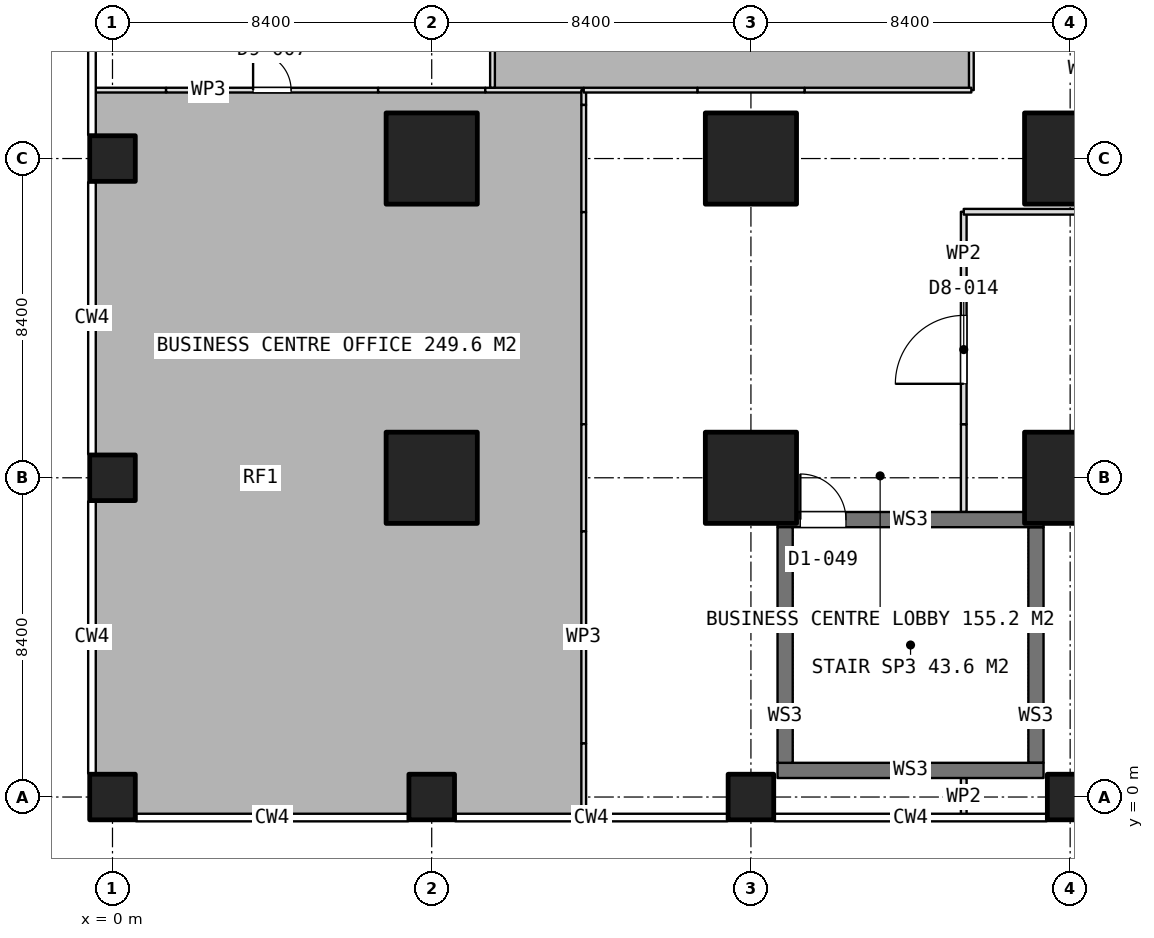
"""IFC4 building model, lengths in metres.
Left out: names, types, materials, properties, quantities, classifications, styles, units other than length and angle.
Written with IfcOpenShell. Run it as: python <this file> out.ifc"""

import sys

from ifc_helpers import new_model, si_unit, direction, frame, frame_2d, origin, origin_2d, place, context, subcontext, project, spatial, rectangle, extrude, element, fill, save


model = new_model("IFC4")
c1 = context("Model", 3, precision=1e-05, world=origin(), true_north=direction((0.0, 1.0)))
c2 = subcontext(c1, "Body", "Model", "MODEL_VIEW")
j1 = project(units=[si_unit("LENGTHUNIT", "METRE"), si_unit("PLANEANGLEUNIT", "RADIAN")], contexts=[c1])
p1 = place(None, origin())
s1 = spatial("IfcSite", under=j1, at=p1, CompositionType="ELEMENT")
p2 = place(p1, origin())
s2 = spatial("IfcBuilding", under=s1, at=p2, CompositionType="ELEMENT")
p3 = place(p2, frame((0.0, 0.0, 20.4)))
s3 = spatial("IfcBuildingStorey", under=s2, at=p3, CompositionType="ELEMENT", Elevation=20.4)
for number, where, z_axis, x_axis in (
    (1, (0.0, 0.0, 0.0), (0.0, 0.0, 1.0), (1.0, 0.0, 0.0)),
    (2, (0.0, 8.4, 0.0), (0.0, 0.0, 1.0), (1.0, 0.0, 0.0)),
    (3, (0.0, 16.8, 0.0), (0.0, 0.0, 1.0), (1.0, 0.0, 0.0)),
    (4, (8.4, 0.0, 0.0), (0.0, 0.0, 1.0), (1.0, 0.0, 0.0)),
):
    element("IfcColumn", number, at=place(p3, frame(where, z_axis=z_axis, x_axis=x_axis)), inside=s3, PredefinedType="COLUMN", context=c2, shape_type="SweptSolid", body=[
        extrude(rectangle(XDim=1.2, YDim=1.2, at=origin_2d()), origin(), (0.0, 0.0, 1.0), 5.0),
    ])
for number, where, z_axis, x_axis in (
    (5, (8.4, 8.4, 0.0), (0.0, 0.0, 1.0), (1.0, 0.0, 0.0)),
    (6, (8.4, 16.8, 0.0), (0.0, 0.0, 1.0), (1.0, 0.0, 0.0)),
):
    element("IfcColumn", number, at=place(p3, frame(where, z_axis=z_axis, x_axis=x_axis)), inside=s3, PredefinedType="COLUMN", context=c2, shape_type="SweptSolid", body=[
        extrude(rectangle(XDim=2.4, YDim=2.4, at=origin_2d()), origin(), (0.0, 0.0, 1.0), 5.0),
    ])
p4 = place(p3, frame((16.8, 0.0, 0.0), z_axis=(0.0, 0.0, 1.0), x_axis=(1.0, 0.0, 0.0)))
e7 = element("IfcColumn", 7, at=p4, inside=s3, PredefinedType="COLUMN", context=c2, shape_type="SweptSolid", body=[
    extrude(rectangle(XDim=1.2, YDim=1.2, at=origin_2d()), origin(), (0.0, 0.0, 1.0), 5.0),
])
for number, where, z_axis, x_axis in (
    (8, (16.8, 8.4, 0.0), (0.0, 0.0, 1.0), (1.0, 0.0, 0.0)),
    (9, (16.8, 16.8, 0.0), (0.0, 0.0, 1.0), (1.0, 0.0, 0.0)),
):
    element("IfcColumn", number, at=place(p3, frame(where, z_axis=z_axis, x_axis=x_axis)), inside=s3, PredefinedType="COLUMN", context=c2, shape_type="SweptSolid", body=[
        extrude(rectangle(XDim=2.4, YDim=2.4, at=origin_2d()), origin(), (0.0, 0.0, 1.0), 5.0),
    ])
p5 = place(p3, frame((25.2, 0.0, 0.0), z_axis=(0.0, 0.0, 1.0), x_axis=(1.0, 0.0, 0.0)))
e10 = element("IfcColumn", 10, at=p5, inside=s3, PredefinedType="COLUMN", context=c2, shape_type="SweptSolid", body=[
    extrude(rectangle(XDim=1.2, YDim=1.2, at=origin_2d()), origin(), (0.0, 0.0, 1.0), 5.0),
])
for number, where, z_axis, x_axis in (
    (11, (25.2, 8.4, 0.0), (0.0, 0.0, 1.0), (1.0, 0.0, 0.0)),
    (12, (25.2, 16.8, 0.0), (0.0, 0.0, 1.0), (1.0, 0.0, 0.0)),
):
    element("IfcColumn", number, at=place(p3, frame(where, z_axis=z_axis, x_axis=x_axis)), inside=s3, PredefinedType="COLUMN", context=c2, shape_type="SweptSolid", body=[
        extrude(rectangle(XDim=2.4, YDim=2.4, at=origin_2d()), origin(), (0.0, 0.0, 1.0), 5.0),
    ])
p6 = place(p3, frame((17.5, 0.7, 0.0), z_axis=(0.0, 0.0, 1.0), x_axis=(1.0, 0.0, 0.0)))
e13 = element("IfcWall", 13, at=p6, inside=s3, PredefinedType="SOLIDWALL", context=c2, shape_type="SweptSolid", body=[
    extrude(rectangle(XDim=7.0, YDim=0.4, at=frame_2d((3.5, 0.0))), origin(), (0.0, 0.0, 1.0), 2.8),
])
p7 = place(p3, frame((17.5, 7.3, 0.0), z_axis=(0.0, 0.0, 1.0), x_axis=(1.0, 0.0, 0.0)))
e14 = element("IfcWall", 14, at=p7, inside=s3, PredefinedType="SOLIDWALL", context=c2, shape_type="SweptSolid", body=[
    extrude(rectangle(XDim=7.0, YDim=0.4, at=frame_2d((3.5, 0.0))), origin(), (0.0, 0.0, 1.0), 2.8),
])
p8 = place(p7, frame((0.6, 0.0, 0.0)))
e15 = element("IfcOpeningElement", 15, at=p8, cuts=e14, PredefinedType="OPENING", context=c2, shape_type="SweptSolid", body=[
    extrude(rectangle(XDim=1.2, YDim=2.1, at=frame_2d((0.6, 1.05))), frame((0.0, 0.21, 0.0), z_axis=(0.0, -1.0, 0.0), x_axis=(1.0, 0.0, 0.0)), (0.0, 0.0, 1.0), 0.42),
])
for number, where, z_axis, x_axis in (
    (16, (17.7, 0.9, 0.0), (0.0, 0.0, 1.0), (0.0, 1.0, 0.0)),
    (17, (24.3, 0.9, 0.0), (0.0, 0.0, 1.0), (0.0, 1.0, 0.0)),
):
    element("IfcWall", number, at=place(p3, frame(where, z_axis=z_axis, x_axis=x_axis)), inside=s3, PredefinedType="SOLIDWALL", context=c2, shape_type="SweptSolid", body=[
        extrude(rectangle(XDim=6.2, YDim=0.4, at=frame_2d((3.1, 0.0))), origin(), (0.0, 0.0, 1.0), 2.8),
    ])
p9 = place(p3, frame((22.4, 7.5, 0.0), z_axis=(0.0, 0.0, 1.0), x_axis=(0.0, 1.0, 0.0)))
e18 = element("IfcWall", 18, at=p9, inside=s3, PredefinedType="PARTITIONING", context=c2, shape_type="SweptSolid", body=[
    extrude(rectangle(XDim=2.31, YDim=0.15, at=frame_2d((1.155, 0.0))), origin(), (0.0, 0.0, 1.0), 2.8),
])
p10 = place(p3, frame((22.4, 9.81, 0.0), z_axis=(0.0, 0.0, 1.0), x_axis=(0.0, 1.0, 0.0)))
e19 = element("IfcWall", 19, at=p10, inside=s3, PredefinedType="PARTITIONING", context=c2, shape_type="SweptSolid", body=[
    extrude(rectangle(XDim=5.59, YDim=0.15, at=frame_2d((2.795, 0.0))), origin(), (0.0, 0.0, 1.0), 2.8),
])
p11 = place(p10, frame((1.063, 0.0, 0.0)))
e20 = element("IfcOpeningElement", 20, at=p11, cuts=e19, PredefinedType="OPENING", context=c2, shape_type="SweptSolid", body=[
    extrude(rectangle(XDim=1.8, YDim=2.1, at=frame_2d((0.9, 1.05))), frame((0.0, 0.085, 0.0), z_axis=(0.0, -1.0, 0.0), x_axis=(1.0, 0.0, 0.0)), (0.0, 0.0, 1.0), 0.17),
])
p12 = place(p3, frame((22.4, 15.4, 0.0), z_axis=(0.0, 0.0, 1.0), x_axis=(1.0, 0.0, 0.0)))
e21 = element("IfcWall", 21, at=p12, inside=s3, PredefinedType="PARTITIONING", context=c2, shape_type="SweptSolid", body=[
    extrude(rectangle(XDim=30.8, YDim=0.15, at=frame_2d((15.4, 0.0))), origin(), (0.0, 0.0, 1.0), 2.8),
])
p13 = place(p3, frame((22.4, -0.49, 0.0), z_axis=(0.0, 0.0, 1.0), x_axis=(0.0, 1.0, 0.0)))
e22 = element("IfcWall", 22, at=p13, inside=s3, PredefinedType="PARTITIONING", context=c2, shape_type="SweptSolid", body=[
    extrude(rectangle(XDim=0.99, YDim=0.15, at=frame_2d((0.495, 0.0))), origin(), (0.0, 0.0, 1.0), 2.8),
])
p14 = place(p3, frame((-0.49, 18.6, 0.0), z_axis=(0.0, 0.0, 1.0), x_axis=(1.0, 0.0, 0.0)))
e23 = element("IfcWall", 23, at=p14, inside=s3, PredefinedType="PARTITIONING", context=c2, shape_type="SweptSolid", body=[
    extrude(rectangle(XDim=1.9, YDim=0.125, at=frame_2d((0.95, 0.0))), origin(), (0.0, 0.0, 1.0), 2.8),
])
p15 = place(p3, frame((1.41, 18.6, 0.0), z_axis=(0.0, 0.0, 1.0), x_axis=(1.0, 0.0, 0.0)))
e24 = element("IfcWall", 24, at=p15, inside=s3, PredefinedType="PARTITIONING", context=c2, shape_type="SweptSolid", body=[
    extrude(rectangle(XDim=5.58, YDim=0.125, at=frame_2d((2.79, 0.0))), origin(), (0.0, 0.0, 1.0), 4.6),
])
p16 = place(p15, frame((2.29, 0.0, 0.0)))
e25 = element("IfcOpeningElement", 25, at=p16, cuts=e24, PredefinedType="OPENING", context=c2, shape_type="SweptSolid", body=[
    extrude(rectangle(XDim=1.0, YDim=2.1, at=frame_2d((0.5, 1.05))), frame((0.0, 0.073, 0.0), z_axis=(0.0, -1.0, 0.0), x_axis=(1.0, 0.0, 0.0)), (0.0, 0.0, 1.0), 0.145),
])
p17 = place(p3, frame((6.99, 18.6, 0.0), z_axis=(0.0, 0.0, 1.0), x_axis=(1.0, 0.0, 0.0)))
e26 = element("IfcWall", 26, at=p17, inside=s3, PredefinedType="PARTITIONING", context=c2, shape_type="SweptSolid", body=[
    extrude(rectangle(XDim=2.82, YDim=0.125, at=frame_2d((1.41, 0.0))), origin(), (0.0, 0.0, 1.0), 2.8),
])
p18 = place(p3, frame((9.81, 18.6, 0.0), z_axis=(0.0, 0.0, 1.0), x_axis=(1.0, 0.0, 0.0)))
e27 = element("IfcWall", 27, at=p18, inside=s3, PredefinedType="PARTITIONING", context=c2, shape_type="SweptSolid", body=[
    extrude(rectangle(XDim=2.59, YDim=0.125, at=frame_2d((1.295, 0.0))), origin(), (0.0, 0.0, 1.0), 4.6),
])
p19 = place(p3, frame((12.4, 18.6, 0.0), z_axis=(0.0, 0.0, 1.0), x_axis=(0.0, -1.0, 0.0)))
e28 = element("IfcWall", 28, at=p19, inside=s3, PredefinedType="PARTITIONING", context=c2, shape_type="SweptSolid", body=[
    extrude(rectangle(XDim=0.39, YDim=0.125, at=frame_2d((0.195, 0.0))), origin(), (0.0, 0.0, 1.0), 4.6),
])
p20 = place(p3, frame((12.4, 18.21, 0.0), z_axis=(0.0, 0.0, 1.0), x_axis=(0.0, -1.0, 0.0)))
e29 = element("IfcWall", 29, at=p20, inside=s3, PredefinedType="PARTITIONING", context=c2, shape_type="SweptSolid", body=[
    extrude(rectangle(XDim=2.82, YDim=0.125, at=frame_2d((1.41, 0.0))), origin(), (0.0, 0.0, 1.0), 2.8),
])
p21 = place(p3, frame((12.4, 15.39, 0.0), z_axis=(0.0, 0.0, 1.0), x_axis=(0.0, -1.0, 0.0)))
e30 = element("IfcWall", 30, at=p21, inside=s3, PredefinedType="PARTITIONING", context=c2, shape_type="SweptSolid", body=[
    extrude(rectangle(XDim=5.58, YDim=0.125, at=frame_2d((2.79, 0.0))), origin(), (0.0, 0.0, 1.0), 4.6),
])
p22 = place(p3, frame((12.4, 9.81, 0.0), z_axis=(0.0, 0.0, 1.0), x_axis=(0.0, -1.0, 0.0)))
e31 = element("IfcWall", 31, at=p22, inside=s3, PredefinedType="PARTITIONING", context=c2, shape_type="SweptSolid", body=[
    extrude(rectangle(XDim=2.82, YDim=0.125, at=frame_2d((1.41, 0.0))), origin(), (0.0, 0.0, 1.0), 2.8),
])
p23 = place(p3, frame((12.4, 6.99, 0.0), z_axis=(0.0, 0.0, 1.0), x_axis=(0.0, -1.0, 0.0)))
e32 = element("IfcWall", 32, at=p23, inside=s3, PredefinedType="PARTITIONING", context=c2, shape_type="SweptSolid", body=[
    extrude(rectangle(XDim=5.58, YDim=0.125, at=frame_2d((2.79, 0.0))), origin(), (0.0, 0.0, 1.0), 4.6),
])
p24 = place(p3, frame((12.4, 1.41, 0.0), z_axis=(0.0, 0.0, 1.0), x_axis=(0.0, -1.0, 0.0)))
e33 = element("IfcWall", 33, at=p24, inside=s3, PredefinedType="PARTITIONING", context=c2, shape_type="SweptSolid", body=[
    extrude(rectangle(XDim=1.9, YDim=0.125, at=frame_2d((0.95, 0.0))), origin(), (0.0, 0.0, 1.0), 2.8),
])
p25 = place(p3, frame((22.6, 28.4, 0.0), z_axis=(0.0, 0.0, 1.0), x_axis=(0.0, -1.0, 0.0)))
e34 = element("IfcWall", 34, at=p25, inside=s3, PredefinedType="PARTITIONING", context=c2, shape_type="SweptSolid", body=[
    extrude(rectangle(XDim=9.8, YDim=0.125, at=frame_2d((4.9, 0.0))), origin(), (0.0, 0.0, 1.0), 4.6),
])
p26 = place(p25, frame((4.4, 0.0, 0.0)))
e35 = element("IfcOpeningElement", 35, at=p26, cuts=e34, PredefinedType="OPENING", context=c2, shape_type="SweptSolid", body=[
    extrude(rectangle(XDim=1.0, YDim=2.1, at=frame_2d((0.5, 1.05))), frame((0.0, 0.073, 0.0), z_axis=(0.0, -1.0, 0.0), x_axis=(1.0, 0.0, 0.0)), (0.0, 0.0, 1.0), 0.145),
])
p27 = place(p3, frame((22.6, 18.6, 0.0), z_axis=(0.0, 0.0, 1.0), x_axis=(-1.0, 0.0, 0.0)))
e36 = element("IfcWall", 36, at=p27, inside=s3, PredefinedType="PARTITIONING", context=c2, shape_type="SweptSolid", body=[
    extrude(rectangle(XDim=4.39, YDim=0.125, at=frame_2d((2.195, 0.0))), origin(), (0.0, 0.0, 1.0), 4.6),
])
p28 = place(p3, frame((18.21, 18.6, 0.0), z_axis=(0.0, 0.0, 1.0), x_axis=(-1.0, 0.0, 0.0)))
e37 = element("IfcWall", 37, at=p28, inside=s3, PredefinedType="PARTITIONING", context=c2, shape_type="SweptSolid", body=[
    extrude(rectangle(XDim=2.82, YDim=0.125, at=frame_2d((1.41, 0.0))), origin(), (0.0, 0.0, 1.0), 2.8),
])
p29 = place(p3, frame((15.39, 18.6, 0.0), z_axis=(0.0, 0.0, 1.0), x_axis=(-1.0, 0.0, 0.0)))
e38 = element("IfcWall", 38, at=p29, inside=s3, PredefinedType="PARTITIONING", context=c2, shape_type="SweptSolid", body=[
    extrude(rectangle(XDim=2.99, YDim=0.125, at=frame_2d((1.495, 0.0))), origin(), (0.0, 0.0, 1.0), 4.6),
])
p30 = place(p3, frame((10.0, 18.663, 0.0), z_axis=(0.0, 0.0, 1.0), x_axis=(0.0, 1.0, 0.0)))
e39 = element("IfcWall", 39, at=p30, inside=s3, PredefinedType="PARTITIONING", context=c2, shape_type="SweptSolid", body=[
    extrude(rectangle(XDim=5.127, YDim=0.125, at=frame_2d((2.563, 0.0))), origin(), (0.0, 0.0, 1.0), 4.6),
])
p31 = place(p11, origin())
e40 = element("IfcDoor", 40, at=p31, inside=s3, OperationType="DOUBLE_DOOR_SINGLE_SWING", PredefinedType="DOOR", context=c2, shape_type="SweptSolid", body=[
    extrude(rectangle(XDim=1.8, YDim=2.1, at=frame_2d((0.9, 1.05))), frame((0.0, 0.025, 0.0), z_axis=(0.0, -1.0, 0.0), x_axis=(1.0, 0.0, 0.0)), (0.0, 0.0, 1.0), 0.05),
])
fill(e20, e40)
p32 = place(p16, origin())
e41 = element("IfcDoor", 41, at=p32, inside=s3, OperationType="SINGLE_SWING_LEFT", PredefinedType="DOOR", context=c2, shape_type="SweptSolid", body=[
    extrude(rectangle(XDim=1.0, YDim=2.1, at=frame_2d((0.5, 1.05))), frame((0.0, 0.025, 0.0), z_axis=(0.0, -1.0, 0.0), x_axis=(1.0, 0.0, 0.0)), (0.0, 0.0, 1.0), 0.05),
])
fill(e25, e41)
p33 = place(p8, origin())
e42 = element("IfcDoor", 42, at=p33, inside=s3, OperationType="SINGLE_SWING_RIGHT", PredefinedType="DOOR", context=c2, shape_type="SweptSolid", body=[
    extrude(rectangle(XDim=1.2, YDim=2.1, at=frame_2d((0.6, 1.05))), frame((0.0, 0.025, 0.0), z_axis=(0.0, -1.0, 0.0), x_axis=(1.0, 0.0, 0.0)), (0.0, 0.0, 1.0), 0.05),
])
fill(e15, e42)
save(model, sys.argv[1])
